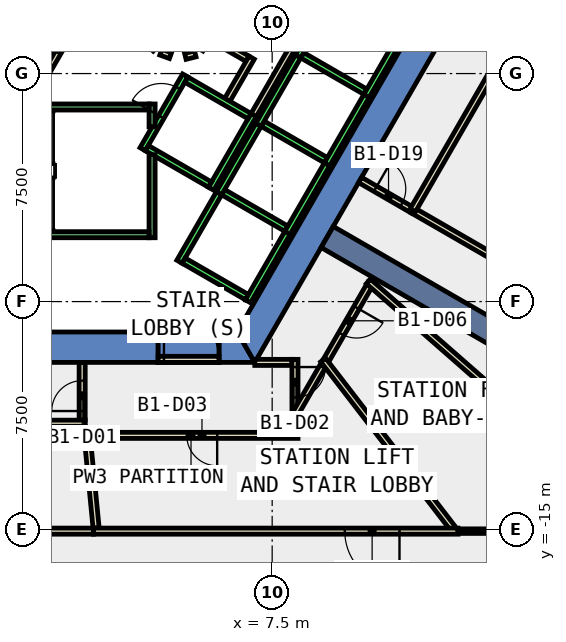
"""IFC4 building model, lengths in metres.
Left out: names, types, materials, properties, quantities, classifications, styles, units other than length and angle.
Written with IfcOpenShell. Run it as: python <this file> out.ifc"""

import sys

from ifc_helpers import new_model, si_unit, direction, frame, frame_2d, origin, place, context, subcontext, project, spatial, polyline, rectangle, outline, extrude, element, fill, save


model = new_model("IFC4")
c1 = context("Model", 3, precision=1e-05, world=origin(), true_north=direction((0.0, 1.0)))
c2 = subcontext(c1, "Body", "Model", "MODEL_VIEW")
j1 = project(units=[si_unit("LENGTHUNIT", "METRE"), si_unit("PLANEANGLEUNIT", "RADIAN")], contexts=[c1])
p1 = place(None, origin())
s1 = spatial("IfcSite", under=j1, at=p1, CompositionType="ELEMENT")
p2 = place(p1, origin())
s2 = spatial("IfcBuilding", under=s1, at=p2, CompositionType="ELEMENT")
p3 = place(p2, frame((0.0, 0.0, -5.5)))
s3 = spatial("IfcBuildingStorey", under=s2, at=p3, CompositionType="ELEMENT", Elevation=-5.5)
p4 = place(p3, frame((0.0, 0.0, -0.42)))
e1 = element("IfcWall", 1, at=p4, inside=s3, PredefinedType="SHEAR", context=c2, shape_type="SweptSolid", body=[
    extrude(outline(polyline([(3.75, -9.5), (3.75, -8.5), (-6.351, -8.5), (-6.928, -9.5), (3.75, -9.5)])), origin(), (0.0, 0.0, 1.0), 5.42),
])
p5 = place(p3, frame((0.0, 0.0, -0.42)))
e2 = element("IfcWall", 2, at=p5, inside=s3, PredefinedType="SHEAR", context=c2, shape_type="SweptSolid", body=[
    extrude(outline(polyline([(5.75, -8.5), (5.75, -9.5), (6.928, -9.5), (6.351, -8.5), (5.75, -8.5)])), origin(), (0.0, 0.0, 1.0), 5.42),
])
p6 = place(p3, frame((0.0, 0.0, 3.6)))
e3 = element("IfcWall", 3, at=p6, inside=s3, PredefinedType="SHEAR", context=c2, shape_type="SweptSolid", body=[
    extrude(outline(polyline([(5.75, -9.5), (5.75, -8.5), (3.75, -8.5), (3.75, -9.5), (5.75, -9.5)])), origin(), (0.0, 0.0, 1.0), 1.4),
])
p7 = place(p3, frame((0.0, 0.0, -0.42)))
e4 = element("IfcWall", 4, at=p7, inside=s3, PredefinedType="SHEAR", context=c2, shape_type="SweptSolid", body=[
    extrude(outline(polyline([(6.928, -9.5), (13.856, 2.5), (12.702, 2.5), (6.351, -8.5), (6.928, -9.5)])), origin(), (0.0, 0.0, 1.0), 5.42),
])
p8 = place(p3, frame((9.31, -5.375, -0.42), z_axis=(0.0, 0.0, 1.0), x_axis=(0.866017533419, -0.500013631625, 0.0)))
e5 = element("IfcWall", 5, at=p8, inside=s3, PredefinedType="SHEAR", context=c2, shape_type="SweptSolid", body=[
    extrude(rectangle(XDim=9.0, YDim=0.8, at=frame_2d((4.5, 0.0))), origin(), (0.0, 0.0, 1.0), 5.42),
])
p9 = place(p3, frame((1.25, -11.4, 0.0), z_axis=(0.0, 0.0, 1.0), x_axis=(0.0, 1.0, 0.0)))
e6 = element("IfcWall", 6, at=p9, inside=s3, PredefinedType="PARTITIONING", context=c2, shape_type="SweptSolid", body=[
    extrude(rectangle(XDim=1.9, YDim=0.2, at=frame_2d((0.95, 0.0))), origin(), (0.0, 0.0, 1.0), 4.9),
])
p10 = place(p9, frame((0.3, 0.0, 0.0)))
e7 = element("IfcOpeningElement", 7, at=p10, cuts=e6, PredefinedType="OPENING", context=c2, shape_type="SweptSolid", body=[
    extrude(rectangle(XDim=1.0, YDim=2.1, at=frame_2d((0.5, 1.05))), frame((0.0, 0.11, 0.0), z_axis=(0.0, -1.0, 0.0), x_axis=(1.0, 0.0, 0.0)), (0.0, 0.0, 1.0), 0.22),
])
p11 = place(p3, frame((6.928, -9.5, 0.0), z_axis=(0.0, 0.0, 1.0), x_axis=(1.0, 0.0, 0.0)))
e8 = element("IfcWall", 8, at=p11, inside=s3, PredefinedType="PARTITIONING", context=c2, shape_type="SweptSolid", body=[
    extrude(rectangle(XDim=1.222, YDim=0.2, at=frame_2d((0.611, 0.0))), origin(), (0.0, 0.0, 1.0), 4.9),
])
p12 = place(p3, frame((8.25, -9.4, 0.0), z_axis=(0.0, 0.0, 1.0), x_axis=(0.0, -1.0, 0.0)))
e9 = element("IfcWall", 9, at=p12, inside=s3, PredefinedType="PARTITIONING", context=c2, shape_type="SweptSolid", body=[
    extrude(rectangle(XDim=1.71, YDim=0.2, at=frame_2d((0.855, 0.0))), origin(), (0.0, 0.0, 1.0), 4.9),
])
p13 = place(p12, frame((0.253, 0.0, 0.0)))
e10 = element("IfcOpeningElement", 10, at=p13, cuts=e9, PredefinedType="OPENING", context=c2, shape_type="SweptSolid", body=[
    extrude(rectangle(XDim=1.0, YDim=2.1, at=frame_2d((0.5, 1.05))), frame((0.0, 0.11, 0.0), z_axis=(0.0, -1.0, 0.0), x_axis=(1.0, 0.0, 0.0)), (0.0, 0.0, 1.0), 0.22),
])
p14 = place(p3, frame((8.35, -11.9, 0.0), z_axis=(0.0, 0.0, 1.0), x_axis=(-1.0, 0.0, 0.0)))
e11 = element("IfcWall", 11, at=p14, inside=s3, PredefinedType="PARTITIONING", context=c2, shape_type="SweptSolid", body=[
    extrude(rectangle(XDim=7.039, YDim=0.2, at=frame_2d((3.52, 0.0))), origin(), (0.0, 0.0, 1.0), 4.9),
])
p15 = place(p14, frame((2.659, 0.0, 0.0)))
e12 = element("IfcOpeningElement", 12, at=p15, cuts=e11, PredefinedType="OPENING", context=c2, shape_type="SweptSolid", body=[
    extrude(rectangle(XDim=1.0, YDim=2.1, at=frame_2d((0.5, 1.05))), frame((0.0, 0.11, 0.0), z_axis=(0.0, -1.0, 0.0), x_axis=(1.0, 0.0, 0.0)), (0.0, 0.0, 1.0), 0.22),
])
p16 = place(p3, frame((8.25, -11.31, 0.0), z_axis=(0.0, 0.0, 1.0), x_axis=(0.0, -1.0, 0.0)))
e13 = element("IfcWall", 13, at=p16, inside=s3, PredefinedType="PARTITIONING", context=c2, shape_type="SweptSolid", body=[
    extrude(rectangle(XDim=0.49, YDim=0.2, at=frame_2d((0.245, 0.0))), origin(), (0.0, 0.0, 1.0), 4.9),
])
p17 = place(p3, frame((1.25, -12.0, 0.0), z_axis=(0.0, 0.0, 1.0), x_axis=(0.0, 1.0, 0.0)))
e14 = element("IfcWall", 14, at=p17, inside=s3, PredefinedType="PARTITIONING", context=c2, shape_type="SweptSolid", body=[
    extrude(rectangle(XDim=0.4, YDim=0.2, at=frame_2d((0.2, 0.0))), origin(), (0.0, 0.0, 1.0), 4.9),
])
p18 = place(p3, frame((1.35, -11.5, 0.0), z_axis=(0.0, 0.0, 1.0), x_axis=(-1.0, 0.0, 0.0)))
e15 = element("IfcWall", 15, at=p18, inside=s3, PredefinedType="PARTITIONING", context=c2, shape_type="SweptSolid", body=[
    extrude(rectangle(XDim=8.646, YDim=0.2, at=frame_2d((4.323, 0.0))), origin(), (0.0, 0.0, 1.0), 4.9),
])
p19 = place(p18, frame((3.718, 0.0, 0.0)))
e16 = element("IfcOpeningElement", 16, at=p19, cuts=e15, PredefinedType="OPENING", context=c2, shape_type="SweptSolid", body=[
    extrude(rectangle(XDim=1.0, YDim=2.1, at=frame_2d((0.5, 1.05))), frame((0.0, 0.11, 0.0), z_axis=(0.0, -1.0, 0.0), x_axis=(1.0, 0.0, 0.0)), (0.0, 0.0, 1.0), 0.22),
])
p20 = place(p3, frame((9.238, -9.498, 0.0), z_axis=(0.0, 0.0, 1.0), x_axis=(-0.499780113518, -0.866152318089, 0.0)))
e17 = element("IfcWall", 17, at=p20, inside=s3, PredefinedType="PARTITIONING", context=c2, shape_type="SweptSolid", body=[
    extrude(rectangle(XDim=2.077, YDim=0.2, at=frame_2d((1.039, 0.0))), origin(), (0.0, 0.0, 1.0), 4.9),
])
p21 = place(p3, frame((10.738, -6.901, 0.0), z_axis=(0.0, 0.0, 1.0), x_axis=(-0.500131122175, -0.865949687125, 0.0)))
e18 = element("IfcWall", 18, at=p21, inside=s3, PredefinedType="PARTITIONING", context=c2, shape_type="SweptSolid", body=[
    extrude(rectangle(XDim=2.999, YDim=0.2, at=frame_2d((1.5, 0.0))), origin(), (0.0, 0.0, 1.0), 4.9),
])
p22 = place(p21, frame((0.921, 0.0, 0.0)))
e19 = element("IfcOpeningElement", 19, at=p22, cuts=e18, PredefinedType="OPENING", context=c2, shape_type="SweptSolid", body=[
    extrude(rectangle(XDim=1.0, YDim=2.1, at=frame_2d((0.5, 1.05))), frame((0.0, 0.11, 0.0), z_axis=(0.0, -1.0, 0.0), x_axis=(1.0, 0.0, 0.0)), (0.0, 0.0, 1.0), 0.22),
])
p23 = place(p3, frame((1.709, -14.95, 0.0), z_axis=(0.0, 0.0, 1.0), x_axis=(-0.097271264249, 0.995257906852, 0.0)))
e20 = element("IfcWall", 20, at=p23, inside=s3, PredefinedType="PARTITIONING", context=c2, shape_type="SweptSolid", body=[
    extrude(rectangle(XDim=3.065, YDim=0.2, at=frame_2d((1.532, 0.0))), origin(), (0.0, 0.0, 1.0), 4.9),
])
p24 = place(p3, frame((9.177, -9.419, 0.0), z_axis=(0.0, 0.0, 1.0), x_axis=(0.610138829962, -0.792294521104, 0.0)))
e21 = element("IfcWall", 21, at=p24, inside=s3, PredefinedType="PARTITIONING", context=c2, shape_type="SweptSolid", body=[
    extrude(rectangle(XDim=7.082, YDim=0.2, at=frame_2d((3.541, 0.0))), origin(), (0.0, 0.0, 1.0), 4.9),
])
p25 = place(p3, frame((13.613, -15.05, 0.0), z_axis=(0.0, 0.0, 1.0), x_axis=(-1.0, 0.0, 0.0)))
e22 = element("IfcWall", 22, at=p25, inside=s3, PredefinedType="PARTITIONING", context=c2, shape_type="SweptSolid", body=[
    extrude(rectangle(XDim=11.994, YDim=0.2, at=frame_2d((5.997, 0.0))), origin(), (0.0, 0.0, 1.0), 4.9),
])
p26 = place(p25, frame((1.925, 0.0, 0.0)))
e23 = element("IfcOpeningElement", 23, at=p26, cuts=e22, PredefinedType="OPENING", context=c2, shape_type="SweptSolid", body=[
    extrude(rectangle(XDim=1.8, YDim=2.1, at=frame_2d((0.9, 1.05))), frame((0.0, 0.11, 0.0), z_axis=(0.0, -1.0, 0.0), x_axis=(1.0, 0.0, 0.0)), (0.0, 0.0, 1.0), 0.22),
])
p27 = place(p3, frame((1.619, -15.05, 0.0), z_axis=(0.0, 0.0, 1.0), x_axis=(-1.0, 0.0, 0.0)))
e24 = element("IfcWall", 24, at=p27, inside=s3, PredefinedType="PARTITIONING", context=c2, shape_type="SweptSolid", body=[
    extrude(rectangle(XDim=10.539, YDim=0.2, at=frame_2d((5.27, 0.0))), origin(), (0.0, 0.0, 1.0), 4.9),
])
p28 = place(p3, frame((10.663, -6.835, 0.0), z_axis=(0.0, 0.0, 1.0), x_axis=(0.752369729321, -0.658741064761, 0.0)))
e25 = element("IfcWall", 25, at=p28, inside=s3, PredefinedType="PARTITIONING", context=c2, shape_type="SweptSolid", body=[
    extrude(rectangle(XDim=12.571, YDim=0.2, at=frame_2d((6.286, 0.0))), origin(), (0.0, 0.0, 1.0), 4.9),
])
p29 = place(p3, frame((19.946, -15.05, 0.0), z_axis=(0.0, 0.0, 1.0), x_axis=(-1.0, 0.0, 0.0)))
e26 = element("IfcWall", 26, at=p29, inside=s3, PredefinedType="PARTITIONING", context=c2, shape_type="SweptSolid", body=[
    extrude(rectangle(XDim=6.333, YDim=0.15, at=frame_2d((3.167, 0.0))), origin(), (0.0, 0.0, 1.0), 4.9),
])
p30 = place(p3, frame((10.392, -3.5, 0.0), z_axis=(0.0, 0.0, 1.0), x_axis=(0.866010750942, -0.50002537861, 0.0)))
e27 = element("IfcWall", 27, at=p30, inside=s3, PredefinedType="PARTITIONING", context=c2, shape_type="SweptSolid", body=[
    extrude(rectangle(XDim=2.0, YDim=0.2, at=frame_2d((1.0, 0.0))), origin(), (0.0, 0.0, 1.0), 4.9),
])
p31 = place(p30, frame((0.58, 0.0, 0.0)))
e28 = element("IfcOpeningElement", 28, at=p31, cuts=e27, PredefinedType="OPENING", context=c2, shape_type="SweptSolid", body=[
    extrude(rectangle(XDim=1.0, YDim=2.1, at=frame_2d((0.5, 1.05))), frame((0.0, 0.11, 0.0), z_axis=(0.0, -1.0, 0.0), x_axis=(1.0, 0.0, 0.0)), (0.0, 0.0, 1.0), 0.22),
])
p32 = place(p3, frame((12.124, -4.5, 0.0), z_axis=(0.0, 0.0, 1.0), x_axis=(0.866066629319, -0.499928588481, 0.0)))
e29 = element("IfcWall", 29, at=p32, inside=s3, PredefinedType="PARTITIONING", context=c2, shape_type="SweptSolid", body=[
    extrude(rectangle(XDim=12.064, YDim=0.2, at=frame_2d((6.032, 0.0))), origin(), (0.0, 0.0, 1.0), 4.9),
])
p33 = place(p3, frame((16.115, 2.413, 0.0), z_axis=(0.0, 0.0, 1.0), x_axis=(-0.499971321283, -0.866041960816, 0.0)))
e30 = element("IfcWall", 30, at=p33, inside=s3, PredefinedType="PARTITIONING", context=c2, shape_type="SweptSolid", body=[
    extrude(rectangle(XDim=7.982, YDim=0.2, at=frame_2d((3.991, 0.0))), origin(), (0.0, 0.0, 1.0), 4.9),
])
p34 = place(p3, frame((5.499, 1.172, 0.0), z_axis=(0.0, 0.0, 1.0), x_axis=(0.866333505267, -0.499465972466, 0.0)))
e31 = element("IfcWall", 31, at=p34, inside=s3, PredefinedType="PARTITIONING", context=c2, shape_type="SweptSolid", body=[
    extrude(rectangle(XDim=1.374, YDim=0.2, at=frame_2d((0.687, 0.0))), origin(), (0.0, 0.0, 1.0), 4.9),
])
p35 = place(p3, frame((6.826, 0.522, 0.0), z_axis=(0.0, 0.0, 1.0), x_axis=(-0.500016722714, -0.866015748706, 0.0)))
e32 = element("IfcWall", 32, at=p35, inside=s3, PredefinedType="PARTITIONING", context=c2, shape_type="SweptSolid", body=[
    extrude(rectangle(XDim=1.7, YDim=0.2, at=frame_2d((0.85, 0.0))), origin(), (0.0, 0.0, 1.0), 4.9),
])
p36 = place(p3, frame((8.192, 0.888, 0.0), z_axis=(0.0, 0.0, 1.0), x_axis=(-0.499940625693, -0.866059680843, 0.0)))
e33 = element("IfcWall", 33, at=p36, inside=s3, PredefinedType="PARTITIONING", context=c2, shape_type="SweptSolid", body=[
    extrude(rectangle(XDim=2.68, YDim=0.2, at=frame_2d((1.34, 0.0))), origin(), (0.0, 0.0, 1.0), 4.9),
])
p37 = place(p3, frame((3.838, 0.702, 0.0), z_axis=(0.0, 0.0, 1.0), x_axis=(0.941035081519, -0.338308993895, 0.0)))
e34 = element("IfcWall", 34, at=p37, inside=s3, PredefinedType="PARTITIONING", context=c2, shape_type="SweptSolid", body=[
    extrude(rectangle(XDim=0.337, YDim=0.2, at=frame_2d((0.168, 0.0))), origin(), (0.0, 0.0, 1.0), 4.9),
])
p38 = place(p3, frame((4.644, 0.564, 0.0), z_axis=(0.0, 0.0, 1.0), x_axis=(0.969929076366, 0.243387729394, 0.0)))
e35 = element("IfcWall", 35, at=p38, inside=s3, PredefinedType="PARTITIONING", context=c2, shape_type="SweptSolid", body=[
    extrude(rectangle(XDim=0.337, YDim=0.2, at=frame_2d((0.168, 0.0))), origin(), (0.0, 0.0, 1.0), 4.9),
])
p39 = place(p3, frame((-0.52, -1.0, 0.0), z_axis=(0.0, 0.0, 1.0), x_axis=(0.50011622646, 0.865958290007, 0.0)))
e36 = element("IfcWall", 36, at=p39, inside=s3, PredefinedType="PARTITIONING", context=c2, shape_type="SweptSolid", body=[
    extrude(rectangle(XDim=4.991, YDim=0.2, at=frame_2d((2.496, 0.0))), origin(), (0.0, 0.0, 1.0), 4.9),
])
p40 = place(p39, frame((1.945, 0.0, 0.0)))
e37 = element("IfcOpeningElement", 37, at=p40, cuts=e36, PredefinedType="OPENING", context=c2, shape_type="SweptSolid", body=[
    extrude(rectangle(XDim=1.0, YDim=2.1, at=frame_2d((0.5, 1.05))), frame((0.0, 0.11, 0.0), z_axis=(0.0, -1.0, 0.0), x_axis=(1.0, 0.0, 0.0)), (0.0, 0.0, 1.0), 0.22),
])
p41 = place(p3, frame((3.75, -9.4, 0.0), z_axis=(0.0, 0.0, 1.0), x_axis=(1.0, 0.0, 0.0)))
e38 = element("IfcWall", 38, at=p41, inside=s3, PredefinedType="PARTITIONING", context=c2, shape_type="SweptSolid", body=[
    extrude(rectangle(XDim=2.0, YDim=0.2, at=frame_2d((1.0, 0.0))), origin(), (0.0, 0.0, 1.0), 2.4),
])
p42 = place(p41, frame((0.19, 0.0, 0.0)))
e39 = element("IfcOpeningElement", 39, at=p42, cuts=e38, PredefinedType="OPENING", context=c2, shape_type="SweptSolid", body=[
    extrude(rectangle(XDim=1.8, YDim=2.1, at=frame_2d((0.9, 1.05))), frame((0.0, 0.11, 0.0), z_axis=(0.0, -1.0, 0.0), x_axis=(1.0, 0.0, 0.0)), (0.0, 0.0, 1.0), 0.22),
])
p43 = place(p3, frame((3.24, -2.488, 0.0), z_axis=(0.0, 0.0, 1.0), x_axis=(0.49994636267, 0.866056369097, 0.0)))
e40 = element("IfcWall", 40, at=p43, inside=s3, PredefinedType="STANDARD", context=c2, shape_type="SweptSolid", body=[
    extrude(rectangle(XDim=2.8, YDim=0.2, at=frame_2d((1.4, 0.0))), origin(), (0.0, 0.0, 1.0), 4.9),
])
p44 = place(p43, frame((1.225, 0.0, 0.0)))
e41 = element("IfcOpeningElement", 41, at=p44, cuts=e40, PredefinedType="OPENING", context=c2, shape_type="SweptSolid", body=[
    extrude(rectangle(XDim=1.1, YDim=2.1, at=frame_2d((0.55, 1.05))), frame((0.0, 0.11, 0.0), z_axis=(0.0, -1.0, 0.0), x_axis=(1.0, 0.0, 0.0)), (0.0, 0.0, 1.0), 0.22),
])
p45 = place(p3, frame((5.492, -3.788, 0.0), z_axis=(0.0, 0.0, 1.0), x_axis=(0.500011755427, 0.866018616679, 0.0)))
e42 = element("IfcWall", 42, at=p45, inside=s3, PredefinedType="STANDARD", context=c2, shape_type="SweptSolid", body=[
    extrude(rectangle(XDim=2.8, YDim=0.2, at=frame_2d((1.4, 0.0))), origin(), (0.0, 0.0, 1.0), 4.9),
])
p46 = place(p3, frame((3.377, -2.452, 0.0), z_axis=(0.0, 0.0, 1.0), x_axis=(0.865955154139, -0.50012165622, 0.0)))
e43 = element("IfcWall", 43, at=p46, inside=s3, PredefinedType="STANDARD", context=c2, shape_type="SweptSolid", body=[
    extrude(rectangle(XDim=2.4, YDim=0.2, at=frame_2d((1.2, 0.0))), origin(), (0.0, 0.0, 1.0), 4.9),
])
p47 = place(p3, frame((4.677, -0.2, 0.0), z_axis=(0.0, 0.0, 1.0), x_axis=(0.865973769406, -0.500089422704, 0.0)))
e44 = element("IfcWall", 44, at=p47, inside=s3, PredefinedType="STANDARD", context=c2, shape_type="SweptSolid", body=[
    extrude(rectangle(XDim=2.399, YDim=0.2, at=frame_2d((1.2, 0.0))), origin(), (0.0, 0.0, 1.0), 4.9),
])
for number, where, z_axis, x_axis in (
    (45, (4.451, -6.19, 0.0), (0.0, 0.0, 1.0), (0.5, 0.866, 0.0)),
    (46, (6.703, -7.49, 0.0), (0.0, 0.0, 1.0), (0.5, 0.866, 0.0)),
):
    element("IfcWall", number, at=place(p3, frame(where, z_axis=z_axis, x_axis=x_axis)), inside=s3, PredefinedType="STANDARD", context=c2, shape_type="SweptSolid", body=[
        extrude(rectangle(XDim=2.8, YDim=0.2, at=frame_2d((1.4, 0.0))), origin(), (0.0, 0.0, 1.0), 3.6),
    ])
for number, where, z_axis, x_axis in (
    (47, (4.588, -6.153, 0.0), (0.0, 0.0, 1.0), (0.866, -0.5, 0.0)),
    (48, (5.888, -3.902, 0.0), (0.0, 0.0, 1.0), (0.866, -0.5, 0.0)),
):
    element("IfcWall", number, at=place(p3, frame(where, z_axis=z_axis, x_axis=x_axis)), inside=s3, PredefinedType="STANDARD", context=c2, shape_type="SweptSolid", body=[
        extrude(rectangle(XDim=2.4, YDim=0.2, at=frame_2d((1.2, 0.0))), origin(), (0.0, 0.0, 1.0), 3.6),
    ])
p48 = place(p3, frame((5.751, -3.938, 0.0), z_axis=(0.0, 0.0, 1.0), x_axis=(0.49994636267, 0.866056369097, 0.0)))
e49 = element("IfcWall", 49, at=p48, inside=s3, PredefinedType="STANDARD", context=c2, shape_type="SweptSolid", body=[
    extrude(rectangle(XDim=2.8, YDim=0.2, at=frame_2d((1.4, 0.0))), origin(), (0.0, 0.0, 1.0), 3.6),
])
p49 = place(p3, frame((8.003, -5.238, 0.0), z_axis=(0.0, 0.0, 1.0), x_axis=(0.500011755427, 0.866018616679, 0.0)))
e50 = element("IfcWall", 50, at=p49, inside=s3, PredefinedType="STANDARD", context=c2, shape_type="SweptSolid", body=[
    extrude(rectangle(XDim=2.8, YDim=0.2, at=frame_2d((1.4, 0.0))), origin(), (0.0, 0.0, 1.0), 3.6),
])
p50 = place(p3, frame((7.188, -1.65, 0.0), z_axis=(0.0, 0.0, 1.0), x_axis=(0.865955154139, -0.50012165622, 0.0)))
e51 = element("IfcWall", 51, at=p50, inside=s3, PredefinedType="STANDARD", context=c2, shape_type="SweptSolid", body=[
    extrude(rectangle(XDim=2.4, YDim=0.2, at=frame_2d((1.2, 0.0))), origin(), (0.0, 0.0, 1.0), 3.6),
])
for number, where, z_axis, x_axis in (
    (52, (7.051, -1.687, 0.0), (0.0, 0.0, 1.0), (0.5, 0.866, 0.0)),
    (53, (9.303, -2.987, 0.0), (0.0, 0.0, 1.0), (0.5, 0.866, 0.0)),
):
    element("IfcWall", number, at=place(p3, frame(where, z_axis=z_axis, x_axis=x_axis)), inside=s3, PredefinedType="STANDARD", context=c2, shape_type="SweptSolid", body=[
        extrude(rectangle(XDim=2.8, YDim=0.2, at=frame_2d((1.4, 0.0))), origin(), (0.0, 0.0, 1.0), 3.6),
    ])
p51 = place(p3, frame((8.488, 0.602, 0.0), z_axis=(0.0, 0.0, 1.0), x_axis=(0.865973769406, -0.500089422704, 0.0)))
e54 = element("IfcWall", 54, at=p51, inside=s3, PredefinedType="STANDARD", context=c2, shape_type="SweptSolid", body=[
    extrude(rectangle(XDim=2.399, YDim=0.2, at=frame_2d((1.2, 0.0))), origin(), (0.0, 0.0, 1.0), 3.6),
])
for number, where, z_axis, x_axis in (
    (55, (8.351, 0.565, 0.0), (0.0, 0.0, 1.0), (0.5, 0.866, 0.0)),
    (56, (10.603, -0.735, 0.0), (0.0, 0.0, 1.0), (0.5, 0.866, 0.0)),
):
    element("IfcWall", number, at=place(p3, frame(where, z_axis=z_axis, x_axis=x_axis)), inside=s3, PredefinedType="STANDARD", context=c2, shape_type="SweptSolid", body=[
        extrude(rectangle(XDim=2.8, YDim=0.2, at=frame_2d((1.4, 0.0))), origin(), (0.0, 0.0, 1.0), 3.6),
    ])
p52 = place(p3, frame((3.55, -2.667, 0.0), z_axis=(0.0, 0.0, 1.0), x_axis=(0.0, -1.0, 0.0)))
e57 = element("IfcWall", 57, at=p52, inside=s3, PredefinedType="STANDARD", context=c2, shape_type="SweptSolid", body=[
    extrude(rectangle(XDim=2.733, YDim=0.2, at=frame_2d((1.366, 0.0))), origin(), (0.0, 0.0, 1.0), 4.9),
])
p53 = place(p3, frame((3.55, -1.0, 0.0), z_axis=(0.0, 0.0, 1.0), x_axis=(0.0, -1.0, 0.0)))
e58 = element("IfcWall", 58, at=p53, inside=s3, PredefinedType="STANDARD", context=c2, shape_type="SweptSolid", body=[
    extrude(rectangle(XDim=0.751, YDim=0.2, at=frame_2d((0.375, 0.0))), origin(), (0.0, 0.0, 1.0), 4.9),
])
p54 = place(p3, frame((-3.45, -1.1, 0.0), z_axis=(0.0, 0.0, 1.0), x_axis=(1.0, 0.0, 0.0)))
e59 = element("IfcWall", 59, at=p54, inside=s3, PredefinedType="STANDARD", context=c2, shape_type="SweptSolid", body=[
    extrude(rectangle(XDim=6.9, YDim=0.2, at=frame_2d((3.45, 0.0))), origin(), (0.0, 0.0, 1.0), 4.9),
])
p55 = place(p54, frame((0.45, 0.0, 0.0)))
e60 = element("IfcOpeningElement", 60, at=p55, cuts=e59, PredefinedType="OPENING", context=c2, shape_type="SweptSolid", body=[
    extrude(rectangle(XDim=1.1, YDim=2.2, at=frame_2d((0.55, 1.1))), frame((0.0, 0.11, 0.0), z_axis=(0.0, -1.0, 0.0), x_axis=(1.0, 0.0, 0.0)), (0.0, 0.0, 1.0), 0.22),
])
p56 = place(p3, frame((-3.45, -5.3, 0.0), z_axis=(0.0, 0.0, 1.0), x_axis=(1.0, 0.0, 0.0)))
e61 = element("IfcWall", 61, at=p56, inside=s3, PredefinedType="STANDARD", context=c2, shape_type="SweptSolid", body=[
    extrude(rectangle(XDim=6.9, YDim=0.2, at=frame_2d((3.45, 0.0))), origin(), (0.0, 0.0, 1.0), 4.9),
])
p57 = place(p10, origin())
e62 = element("IfcDoor", 62, at=p57, inside=s3, OperationType="SINGLE_SWING_LEFT", PredefinedType="DOOR", context=c2, shape_type="SweptSolid", body=[
    extrude(rectangle(XDim=1.0, YDim=2.1, at=frame_2d((0.5, 1.05))), frame((0.0, 0.025, 0.0), z_axis=(0.0, -1.0, 0.0), x_axis=(1.0, 0.0, 0.0)), (0.0, 0.0, 1.0), 0.05),
])
fill(e7, e62)
p58 = place(p13, origin())
e63 = element("IfcDoor", 63, at=p58, inside=s3, OperationType="SINGLE_SWING_RIGHT", PredefinedType="DOOR", context=c2, shape_type="SweptSolid", body=[
    extrude(rectangle(XDim=1.0, YDim=2.1, at=frame_2d((0.5, 1.05))), frame((0.0, 0.025, 0.0), z_axis=(0.0, -1.0, 0.0), x_axis=(1.0, 0.0, 0.0)), (0.0, 0.0, 1.0), 0.05),
])
fill(e10, e63)
p59 = place(p15, origin())
e64 = element("IfcDoor", 64, at=p59, inside=s3, OperationType="SINGLE_SWING_LEFT", PredefinedType="DOOR", context=c2, shape_type="SweptSolid", body=[
    extrude(rectangle(XDim=1.0, YDim=2.1, at=frame_2d((0.5, 1.05))), frame((0.0, 0.025, 0.0), z_axis=(0.0, -1.0, 0.0), x_axis=(1.0, 0.0, 0.0)), (0.0, 0.0, 1.0), 0.05),
])
fill(e12, e64)
p60 = place(p22, origin())
e65 = element("IfcDoor", 65, at=p60, inside=s3, OperationType="SINGLE_SWING_RIGHT", PredefinedType="DOOR", context=c2, shape_type="SweptSolid", body=[
    extrude(rectangle(XDim=1.0, YDim=2.1, at=frame_2d((0.5, 1.05))), frame((0.0, 0.025, 0.0), z_axis=(0.0, -1.0, 0.0), x_axis=(1.0, 0.0, 0.0)), (0.0, 0.0, 1.0), 0.05),
])
fill(e19, e65)
p61 = place(p31, origin())
e66 = element("IfcDoor", 66, at=p61, inside=s3, OperationType="SINGLE_SWING_LEFT", PredefinedType="DOOR", context=c2, shape_type="SweptSolid", body=[
    extrude(rectangle(XDim=1.0, YDim=2.1, at=frame_2d((0.5, 1.05))), frame((0.0, 0.025, 0.0), z_axis=(0.0, -1.0, 0.0), x_axis=(1.0, 0.0, 0.0)), (0.0, 0.0, 1.0), 0.05),
])
fill(e28, e66)
p62 = place(p26, origin())
e67 = element("IfcDoor", 67, at=p62, inside=s3, OperationType="DOUBLE_DOOR_SINGLE_SWING", PredefinedType="DOOR", context=c2, shape_type="SweptSolid", body=[
    extrude(rectangle(XDim=1.8, YDim=2.1, at=frame_2d((0.9, 1.05))), frame((0.0, 0.025, 0.0), z_axis=(0.0, -1.0, 0.0), x_axis=(1.0, 0.0, 0.0)), (0.0, 0.0, 1.0), 0.05),
])
fill(e23, e67)
p63 = place(p40, origin())
e68 = element("IfcDoor", 68, at=p63, inside=s3, OperationType="SINGLE_SWING_LEFT", PredefinedType="DOOR", context=c2, shape_type="SweptSolid", body=[
    extrude(rectangle(XDim=1.0, YDim=2.1, at=frame_2d((0.5, 1.05))), frame((0.0, 0.025, 0.0), z_axis=(0.0, -1.0, 0.0), x_axis=(1.0, 0.0, 0.0)), (0.0, 0.0, 1.0), 0.05),
])
fill(e37, e68)
p64 = place(p42, origin())
e69 = element("IfcDoor", 69, at=p64, inside=s3, OperationType="DOUBLE_DOOR_SINGLE_SWING", PredefinedType="DOOR", context=c2, shape_type="SweptSolid", body=[
    extrude(rectangle(XDim=1.8, YDim=2.1, at=frame_2d((0.9, 1.05))), frame((0.0, 0.025, 0.0), z_axis=(0.0, -1.0, 0.0), x_axis=(1.0, 0.0, 0.0)), (0.0, 0.0, 1.0), 0.05),
])
fill(e39, e69)
p65 = place(p44, origin())
e70 = element("IfcDoor", 70, at=p65, inside=s3, OperationType="SLIDING_TO_LEFT", PredefinedType="DOOR", context=c2, shape_type="SweptSolid", body=[
    extrude(rectangle(XDim=1.1, YDim=2.1, at=frame_2d((0.55, 1.05))), frame((0.0, 0.025, 0.0), z_axis=(0.0, -1.0, 0.0), x_axis=(1.0, 0.0, 0.0)), (0.0, 0.0, 1.0), 0.05),
])
fill(e41, e70)
save(model, sys.argv[1])
